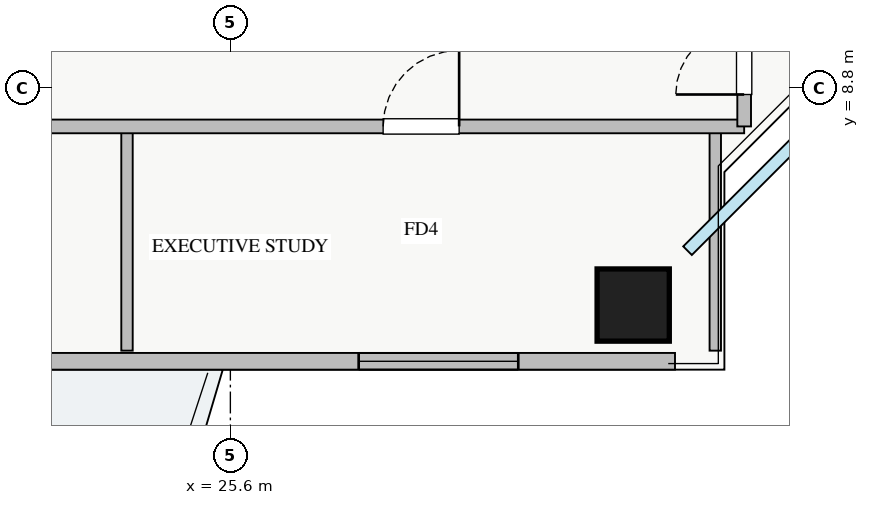
"""IFC4 building model, lengths in metres.
Left out: names, types, materials, properties, quantities, classifications, styles, units other than length and angle.
Written with IfcOpenShell. Run it as: python <this file> out.ifc"""

import sys

from ifc_helpers import new_model, si_unit, direction, frame, frame_2d, origin, origin_2d, place, context, subcontext, project, spatial, rectangle, extrude, source, transform, mapped, element, fill, save


model = new_model("IFC4")
c1 = context("Model", 3, precision=1e-05, world=origin(), true_north=direction((0.0, 1.0)))
c2 = subcontext(c1, "Body", "Model", "MODEL_VIEW")
j1 = project(units=[si_unit("LENGTHUNIT", "METRE"), si_unit("PLANEANGLEUNIT", "RADIAN")], contexts=[c1])
p1 = place(None, origin())
s1 = spatial("IfcSite", under=j1, at=p1, CompositionType="ELEMENT")
p2 = place(p1, origin())
s2 = spatial("IfcBuilding", under=s1, at=p2, CompositionType="ELEMENT")
p3 = place(p2, frame((0.0, 0.0, 150.25)))
s3 = spatial("IfcBuildingStorey", under=s2, at=p3, CompositionType="ELEMENT", Elevation=150.25)
m1 = source(origin(), c2, "Body", "SweptSolid", [
    extrude(rectangle(XDim=0.95, YDim=0.95, at=origin_2d()), origin(), (0.0, 0.0, 1.0), 3.25),
])
p4 = place(p3, frame((30.9, 5.95, 0.0), z_axis=(0.0, 0.0, 1.0), x_axis=(1.0, 0.0, 0.0)))
e1 = element("IfcColumn", 1, at=p4, inside=s3, PredefinedType="COLUMN", context=c2, shape_type="MappedRepresentation", body=[
    mapped(m1, transform((0.0, 0.0, 0.0), x_axis=(1.0, 0.0, 0.0), y_axis=(0.0, 1.0, 0.0), z_axis=(0.0, 0.0, 1.0), scale=1.0)),
])
p5 = place(p3, frame((6.55, 5.21, 0.0), z_axis=(0.0, 0.0, 1.0), x_axis=(1.0, 0.0, 0.0)))
e2 = element("IfcWall", 2, at=p5, inside=s3, PredefinedType="STANDARD", context=c2, shape_type="SweptSolid", body=[
    extrude(rectangle(XDim=24.9, YDim=0.22, at=frame_2d((12.45, 0.0))), origin(), (0.0, 0.0, 1.0), 2.61),
])
p6 = place(p5, frame((13.3, 0.0, 0.0)))
e3 = element("IfcOpeningElement", 3, at=p6, cuts=e2, PredefinedType="OPENING", context=c2, shape_type="SweptSolid", body=[
    extrude(rectangle(XDim=1.2, YDim=2.1, at=frame_2d((0.6, 1.05))), frame((0.0, 0.12, 0.0), z_axis=(0.0, -1.0, 0.0), x_axis=(1.0, 0.0, 0.0)), (0.0, 0.0, 1.0), 0.24),
])
p7 = place(p5, frame((0.357, 0.0, 0.9)))
e4 = element("IfcOpeningElement", 4, at=p7, cuts=e2, PredefinedType="OPENING", context=c2, shape_type="SweptSolid", body=[
    extrude(rectangle(XDim=1.5, YDim=1.5, at=frame_2d((0.75, 0.75))), frame((0.0, 0.12, 0.0), z_axis=(0.0, -1.0, 0.0), x_axis=(1.0, 0.0, 0.0)), (0.0, 0.0, 1.0), 0.24),
])
p8 = place(p5, frame((6.931, 0.0, 0.9)))
e5 = element("IfcOpeningElement", 5, at=p8, cuts=e2, PredefinedType="OPENING", context=c2, shape_type="SweptSolid", body=[
    extrude(rectangle(XDim=1.8, YDim=1.5, at=frame_2d((0.9, 0.75))), frame((0.0, 0.12, 0.0), z_axis=(0.0, -1.0, 0.0), x_axis=(1.0, 0.0, 0.0)), (0.0, 0.0, 1.0), 0.24),
])
p9 = place(p5, frame((14.813, 0.0, 0.9)))
e6 = element("IfcOpeningElement", 6, at=p9, cuts=e2, PredefinedType="OPENING", context=c2, shape_type="SweptSolid", body=[
    extrude(rectangle(XDim=1.5, YDim=1.45, at=frame_2d((0.75, 0.725))), frame((0.0, 0.12, 0.0), z_axis=(0.0, -1.0, 0.0), x_axis=(1.0, 0.0, 0.0)), (0.0, 0.0, 1.0), 0.24),
])
p10 = place(p5, frame((20.738, 0.0, 0.9)))
e7 = element("IfcOpeningElement", 7, at=p10, cuts=e2, PredefinedType="OPENING", context=c2, shape_type="SweptSolid", body=[
    extrude(rectangle(XDim=2.1, YDim=1.48, at=frame_2d((1.05, 0.74))), frame((0.0, 0.12, 0.0), z_axis=(0.0, -1.0, 0.0), x_axis=(1.0, 0.0, 0.0)), (0.0, 0.0, 1.0), 0.24),
])
p11 = place(p5, frame((4.136, 0.0, 0.9)))
e8 = element("IfcOpeningElement", 8, at=p11, cuts=e2, PredefinedType="OPENING", context=c2, shape_type="SweptSolid", body=[
    extrude(rectangle(XDim=2.4, YDim=1.5, at=frame_2d((1.2, 0.75))), frame((0.0, 0.12, 0.0), z_axis=(0.0, -1.0, 0.0), x_axis=(1.0, 0.0, 0.0)), (0.0, 0.0, 1.0), 0.24),
])
p12 = place(p5, frame((10.038, 0.0, 0.9)))
e9 = element("IfcOpeningElement", 9, at=p12, cuts=e2, PredefinedType="OPENING", context=c2, shape_type="SweptSolid", body=[
    extrude(rectangle(XDim=2.4, YDim=1.5, at=frame_2d((1.2, 0.75))), frame((0.0, 0.12, 0.0), z_axis=(0.0, -1.0, 0.0), x_axis=(1.0, 0.0, 0.0)), (0.0, 0.0, 1.0), 0.24),
])
for number, where, z_axis, x_axis in (
    (10, (24.24, 5.35, 0.0), (0.0, 0.0, 1.0), (0.0, 1.0, 0.0)),
    (11, (31.98, 5.35, 0.0), (0.0, 0.0, 1.0), (0.0, 1.0, 0.0)),
):
    element("IfcWall", number, at=place(p3, frame(where, z_axis=z_axis, x_axis=x_axis)), inside=s3, PredefinedType="PARTITIONING", context=c2, shape_type="SweptSolid", body=[
        extrude(rectangle(XDim=2.95, YDim=0.15, at=frame_2d((1.475, 0.0))), origin(), (0.0, 0.0, 1.0), 3.07),
    ])
p13 = place(p3, frame((8.75, 8.3, 0.0), z_axis=(0.0, 0.0, 1.0), x_axis=(1.0, 0.0, 0.0)))
e12 = element("IfcWall", 12, at=p13, inside=s3, PredefinedType="PARTITIONING", context=c2, shape_type="SweptSolid", body=[
    extrude(rectangle(XDim=23.61, YDim=0.18, at=frame_2d((11.805, 0.0))), origin(), (0.0, 0.0, 1.0), 3.07),
])
p14 = place(p13, frame((2.98, 0.0, 0.0)))
e13 = element("IfcOpeningElement", 13, at=p14, cuts=e12, PredefinedType="OPENING", context=c2, shape_type="SweptSolid", body=[
    extrude(rectangle(XDim=1.0, YDim=2.05, at=frame_2d((0.5, 1.025))), frame((0.0, 0.1, 0.0), z_axis=(0.0, -1.0, 0.0), x_axis=(1.0, 0.0, 0.0)), (0.0, 0.0, 1.0), 0.2),
])
p15 = place(p13, frame((10.725, 0.0, 0.0)))
e14 = element("IfcOpeningElement", 14, at=p15, cuts=e12, PredefinedType="OPENING", context=c2, shape_type="SweptSolid", body=[
    extrude(rectangle(XDim=1.0, YDim=2.05, at=frame_2d((0.5, 1.025))), frame((0.0, 0.1, 0.0), z_axis=(0.0, -1.0, 0.0), x_axis=(1.0, 0.0, 0.0)), (0.0, 0.0, 1.0), 0.2),
])
p16 = place(p13, frame((18.86, 0.0, 0.0)))
e15 = element("IfcOpeningElement", 15, at=p16, cuts=e12, PredefinedType="OPENING", context=c2, shape_type="SweptSolid", body=[
    extrude(rectangle(XDim=1.0, YDim=2.05, at=frame_2d((0.5, 1.025))), frame((0.0, 0.1, 0.0), z_axis=(0.0, -1.0, 0.0), x_axis=(1.0, 0.0, 0.0)), (0.0, 0.0, 1.0), 0.2),
])
p17 = place(p3, frame((32.36, 8.3, 0.0), z_axis=(0.0, 0.0, 1.0), x_axis=(0.0, 1.0, 0.0)))
e16 = element("IfcWall", 16, at=p17, inside=s3, PredefinedType="PARTITIONING", context=c2, shape_type="SweptSolid", body=[
    extrude(rectangle(XDim=29.4, YDim=0.18, at=frame_2d((14.7, 0.0))), origin(), (0.0, 0.0, 1.0), 3.07),
])
p18 = place(p17, frame((28.08, 0.0, 0.0)))
e17 = element("IfcOpeningElement", 17, at=p18, cuts=e16, PredefinedType="OPENING", context=c2, shape_type="SweptSolid", body=[
    extrude(rectangle(XDim=0.9, YDim=2.05, at=frame_2d((0.45, 1.025))), frame((0.0, 0.1, 0.0), z_axis=(0.0, -1.0, 0.0), x_axis=(1.0, 0.0, 0.0)), (0.0, 0.0, 1.0), 0.2),
])
p19 = place(p17, frame((0.42, 0.0, 0.0)))
e18 = element("IfcOpeningElement", 18, at=p19, cuts=e16, PredefinedType="OPENING", context=c2, shape_type="SweptSolid", body=[
    extrude(rectangle(XDim=0.9, YDim=2.05, at=frame_2d((0.45, 1.025))), frame((0.0, 0.1, 0.0), z_axis=(0.0, -1.0, 0.0), x_axis=(1.0, 0.0, 0.0)), (0.0, 0.0, 1.0), 0.2),
])
p20 = place(p17, frame((8.05, 0.0, 0.0)))
e19 = element("IfcOpeningElement", 19, at=p20, cuts=e16, PredefinedType="OPENING", context=c2, shape_type="SweptSolid", body=[
    extrude(rectangle(XDim=1.0, YDim=2.05, at=frame_2d((0.5, 1.025))), frame((0.0, 0.1, 0.0), z_axis=(0.0, -1.0, 0.0), x_axis=(1.0, 0.0, 0.0)), (0.0, 0.0, 1.0), 0.2),
])
p21 = place(p17, frame((18.01, 0.0, 0.0)))
e20 = element("IfcOpeningElement", 20, at=p21, cuts=e16, PredefinedType="OPENING", context=c2, shape_type="SweptSolid", body=[
    extrude(rectangle(XDim=1.0, YDim=2.05, at=frame_2d((0.5, 1.025))), frame((0.0, 0.1, 0.0), z_axis=(0.0, -1.0, 0.0), x_axis=(1.0, 0.0, 0.0)), (0.0, 0.0, 1.0), 0.2),
])
m2 = source(origin(), c2, "Body", "SweptSolid", [
    extrude(rectangle(XDim=2.1, YDim=1.48, at=frame_2d((1.05, 0.74))), frame((0.0, 0.03, 0.0), z_axis=(0.0, -1.0, 0.0), x_axis=(1.0, 0.0, 0.0)), (0.0, 0.0, 1.0), 0.06),
])
p22 = place(p10, origin())
e21 = element("IfcWindow", 21, at=p22, inside=s3, PartitioningType="TRIPLE_PANEL_VERTICAL", PredefinedType="WINDOW", context=c2, shape_type="MappedRepresentation", body=[
    mapped(m2, transform((0.0, 0.0, 0.0), x_axis=(1.0, 0.0, 0.0), y_axis=(0.0, 1.0, 0.0), z_axis=(0.0, 0.0, 1.0), scale=1.0)),
])
fill(e7, e21)
m3 = source(origin(), c2, "Body", "SweptSolid", [
    extrude(rectangle(XDim=1.0, YDim=2.05, at=frame_2d((0.5, 1.025))), frame((0.0, 0.025, 0.0), z_axis=(0.0, -1.0, 0.0), x_axis=(1.0, 0.0, 0.0)), (0.0, 0.0, 1.0), 0.05),
])
p23 = place(p16, origin())
e22 = element("IfcDoor", 22, at=p23, inside=s3, OperationType="SINGLE_SWING_RIGHT", PredefinedType="DOOR", context=c2, shape_type="MappedRepresentation", body=[
    mapped(m3, transform((0.0, 0.0, 0.0), x_axis=(1.0, 0.0, 0.0), y_axis=(0.0, 1.0, 0.0), z_axis=(0.0, 0.0, 1.0), scale=1.0)),
])
fill(e15, e22)
m4 = source(origin(), c2, "Body", "SweptSolid", [
    extrude(rectangle(XDim=0.9, YDim=2.05, at=frame_2d((0.45, 1.025))), frame((0.0, 0.025, 0.0), z_axis=(0.0, -1.0, 0.0), x_axis=(1.0, 0.0, 0.0)), (0.0, 0.0, 1.0), 0.05),
])
p24 = place(p19, origin())
e23 = element("IfcDoor", 23, at=p24, inside=s3, OperationType="SINGLE_SWING_LEFT", PredefinedType="DOOR", context=c2, shape_type="MappedRepresentation", body=[
    mapped(m4, transform((0.0, 0.0, 0.0), x_axis=(1.0, 0.0, 0.0), y_axis=(0.0, 1.0, 0.0), z_axis=(0.0, 0.0, 1.0), scale=1.0)),
])
fill(e18, e23)
save(model, sys.argv[1])
